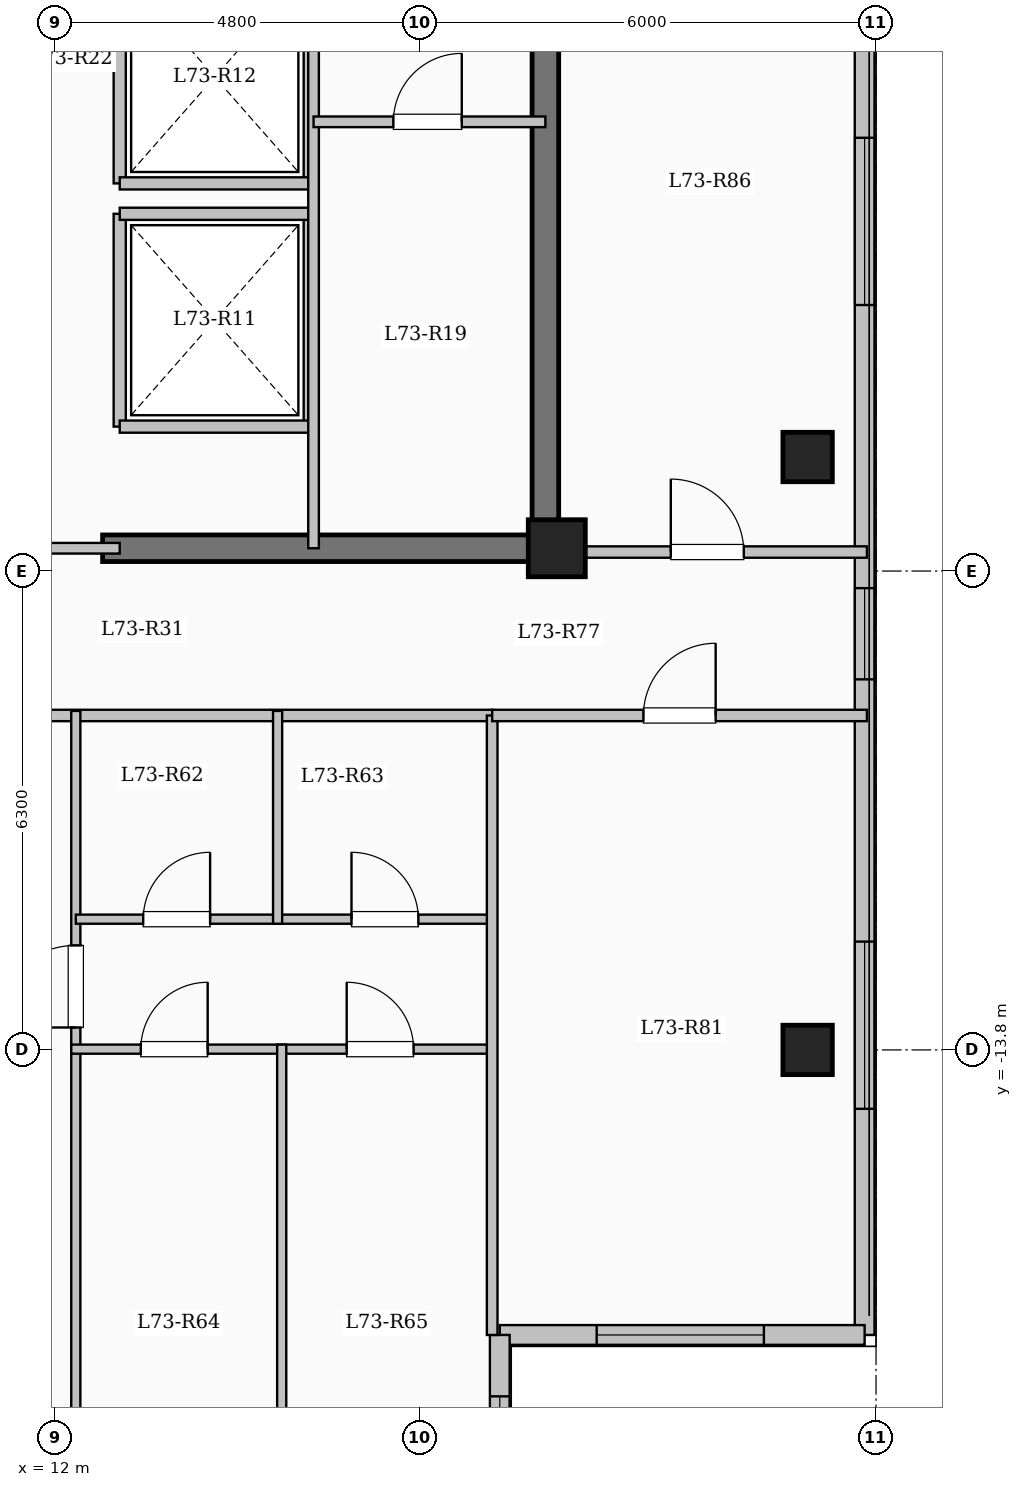
"""IFC4 building model, lengths in metres.
Left out: names, types, materials, properties, quantities, classifications, styles, units other than length and angle.
Written with IfcOpenShell. Run it as: python <this file> out.ifc"""

import sys

from ifc_helpers import new_model, si_unit, direction, frame, frame_2d, origin, origin_2d, place, context, subcontext, project, spatial, rectangle, extrude, element, fill, save


model = new_model("IFC4")
c1 = context("Model", 3, precision=1e-05, world=origin(), true_north=direction((0.0, 1.0)))
c2 = subcontext(c1, "Body", "Model", "MODEL_VIEW")
j1 = project(units=[si_unit("LENGTHUNIT", "METRE"), si_unit("PLANEANGLEUNIT", "RADIAN")], contexts=[c1])
p1 = place(None, origin())
s1 = spatial("IfcSite", under=j1, at=p1, CompositionType="ELEMENT")
p2 = place(p1, origin())
s2 = spatial("IfcBuilding", under=s1, at=p2, CompositionType="ELEMENT")
p3 = place(p2, frame((0.0, 0.0, 268.3)))
s3 = spatial("IfcBuildingStorey", under=s2, at=p3, CompositionType="ELEMENT", Elevation=268.3)
p4 = place(p3, frame((18.6, -7.2, 0.0), z_axis=(0.0, 0.0, 1.0), x_axis=(1.0, 0.0, 0.0)))
e1 = element("IfcColumn", 1, at=p4, inside=s3, PredefinedType="COLUMN", context=c2, shape_type="SweptSolid", body=[
    extrude(rectangle(XDim=0.75, YDim=0.75, at=origin_2d()), origin(), (0.0, 0.0, 1.0), 3.35),
])
for number, where, z_axis, x_axis in (
    (2, (21.9, -13.8, 0.0), (0.0, 0.0, 1.0), (1.0, 0.0, 0.0)),
    (3, (21.9, -6.0, 0.0), (0.0, 0.0, 1.0), (1.0, 0.0, 0.0)),
):
    element("IfcColumn", number, at=place(p3, frame(where, z_axis=z_axis, x_axis=x_axis)), inside=s3, PredefinedType="COLUMN", context=c2, shape_type="SweptSolid", body=[
        extrude(rectangle(XDim=0.65, YDim=0.65, at=origin_2d()), origin(), (0.0, 0.0, 1.0), 3.35),
    ])
p5 = place(p3, frame((22.65, 17.55, 0.0), z_axis=(0.0, 0.0, 1.0), x_axis=(0.0, -1.0, 0.0)))
e4 = element("IfcWall", 4, at=p5, inside=s3, PredefinedType="SOLIDWALL", context=c2, shape_type="SweptSolid", body=[
    extrude(rectangle(XDim=35.1, YDim=0.26, at=frame_2d((17.55, 0.0))), origin(), (0.0, 0.0, 1.0), 3.05),
])
p6 = place(p5, frame((1.525, 0.0, 0.9)))
e5 = element("IfcOpeningElement", 5, at=p6, cuts=e4, PredefinedType="OPENING", context=c2, shape_type="SweptSolid", body=[
    extrude(rectangle(XDim=2.0, YDim=1.7, at=frame_2d((1.0, 0.85))), frame((0.0, 0.14, 0.0), z_axis=(0.0, -1.0, 0.0), x_axis=(1.0, 0.0, 0.0)), (0.0, 0.0, 1.0), 0.28),
])
p7 = place(p5, frame((5.425, 0.0, 0.95)))
e6 = element("IfcOpeningElement", 6, at=p7, cuts=e4, PredefinedType="OPENING", context=c2, shape_type="SweptSolid", body=[
    extrude(rectangle(XDim=1.0, YDim=1.5, at=frame_2d((0.5, 0.75))), frame((0.0, 0.14, 0.0), z_axis=(0.0, -1.0, 0.0), x_axis=(1.0, 0.0, 0.0)), (0.0, 0.0, 1.0), 0.28),
])
p8 = place(p5, frame((8.675, 0.0, 0.9)))
e7 = element("IfcOpeningElement", 7, at=p8, cuts=e4, PredefinedType="OPENING", context=c2, shape_type="SweptSolid", body=[
    extrude(rectangle(XDim=2.0, YDim=1.7, at=frame_2d((1.0, 0.85))), frame((0.0, 0.14, 0.0), z_axis=(0.0, -1.0, 0.0), x_axis=(1.0, 0.0, 0.0)), (0.0, 0.0, 1.0), 0.28),
])
p9 = place(p5, frame((13.5, 0.0, 0.9)))
e8 = element("IfcOpeningElement", 8, at=p9, cuts=e4, PredefinedType="OPENING", context=c2, shape_type="SweptSolid", body=[
    extrude(rectangle(XDim=1.65, YDim=1.6, at=frame_2d((0.825, 0.8))), frame((0.0, 0.14, 0.0), z_axis=(0.0, -1.0, 0.0), x_axis=(1.0, 0.0, 0.0)), (0.0, 0.0, 1.0), 0.28),
])
p10 = place(p5, frame((19.35, 0.0, 0.9)))
e9 = element("IfcOpeningElement", 9, at=p10, cuts=e4, PredefinedType="OPENING", context=c2, shape_type="SweptSolid", body=[
    extrude(rectangle(XDim=2.2, YDim=1.75, at=frame_2d((1.1, 0.875))), frame((0.0, 0.14, 0.0), z_axis=(0.0, -1.0, 0.0), x_axis=(1.0, 0.0, 0.0)), (0.0, 0.0, 1.0), 0.28),
])
p11 = place(p5, frame((25.275, 0.0, 0.95)))
e10 = element("IfcOpeningElement", 10, at=p11, cuts=e4, PredefinedType="OPENING", context=c2, shape_type="SweptSolid", body=[
    extrude(rectangle(XDim=1.2, YDim=1.5, at=frame_2d((0.6, 0.75))), frame((0.0, 0.14, 0.0), z_axis=(0.0, -1.0, 0.0), x_axis=(1.0, 0.0, 0.0)), (0.0, 0.0, 1.0), 0.28),
])
p12 = place(p5, frame((29.925, 0.0, 0.9)))
e11 = element("IfcOpeningElement", 11, at=p12, cuts=e4, PredefinedType="OPENING", context=c2, shape_type="SweptSolid", body=[
    extrude(rectangle(XDim=2.2, YDim=1.75, at=frame_2d((1.1, 0.875))), frame((0.0, 0.14, 0.0), z_axis=(0.0, -1.0, 0.0), x_axis=(1.0, 0.0, 0.0)), (0.0, 0.0, 1.0), 0.28),
])
p13 = place(p3, frame((22.65, -17.55, 0.0), z_axis=(0.0, 0.0, 1.0), x_axis=(-1.0, 0.0, 0.0)))
e12 = element("IfcWall", 12, at=p13, inside=s3, PredefinedType="SOLIDWALL", context=c2, shape_type="SweptSolid", body=[
    extrude(rectangle(XDim=4.8, YDim=0.26, at=frame_2d((2.4, 0.0))), origin(), (0.0, 0.0, 1.0), 3.05),
])
p14 = place(p13, frame((1.325, 0.0, 0.9)))
e13 = element("IfcOpeningElement", 13, at=p14, cuts=e12, PredefinedType="OPENING", context=c2, shape_type="SweptSolid", body=[
    extrude(rectangle(XDim=2.2, YDim=1.75, at=frame_2d((1.1, 0.875))), frame((0.0, 0.14, 0.0), z_axis=(0.0, -1.0, 0.0), x_axis=(1.0, 0.0, 0.0)), (0.0, 0.0, 1.0), 0.28),
])
p15 = place(p3, frame((17.85, -17.55, 0.0), z_axis=(0.0, 0.0, 1.0), x_axis=(0.0, -1.0, 0.0)))
e14 = element("IfcWall", 14, at=p15, inside=s3, PredefinedType="SOLIDWALL", context=c2, shape_type="SweptSolid", body=[
    extrude(rectangle(XDim=3.3, YDim=0.26, at=frame_2d((1.65, 0.0))), origin(), (0.0, 0.0, 1.0), 3.05),
])
p16 = place(p15, frame((0.808, 0.0, 0.9)))
e15 = element("IfcOpeningElement", 15, at=p16, cuts=e14, PredefinedType="OPENING", context=c2, shape_type="SweptSolid", body=[
    extrude(rectangle(XDim=1.65, YDim=1.6, at=frame_2d((0.825, 0.8))), frame((0.0, 0.14, 0.0), z_axis=(0.0, -1.0, 0.0), x_axis=(1.0, 0.0, 0.0)), (0.0, 0.0, 1.0), 0.28),
])
for number, where, z_axis, x_axis in (
    (16, (12.85, -5.6, 0.0), (0.0, 0.0, 1.0), (0.0, 1.0, 0.0)),
    (17, (15.35, -5.6, 0.0), (0.0, 0.0, 1.0), (0.0, 1.0, 0.0)),
):
    element("IfcWall", number, at=place(p3, frame(where, z_axis=z_axis, x_axis=x_axis)), inside=s3, PredefinedType="SOLIDWALL", context=c2, shape_type="SweptSolid", body=[
        extrude(rectangle(XDim=2.8, YDim=0.16, at=frame_2d((1.4, 0.0))), origin(), (0.0, 0.0, 1.0), 3.05),
    ])
for number, where, z_axis, x_axis in (
    (18, (12.85, -5.6, 0.0), (0.0, 0.0, 1.0), (1.0, 0.0, 0.0)),
    (19, (12.85, -2.8, 0.0), (0.0, 0.0, 1.0), (1.0, 0.0, 0.0)),
):
    element("IfcWall", number, at=place(p3, frame(where, z_axis=z_axis, x_axis=x_axis)), inside=s3, PredefinedType="SOLIDWALL", context=c2, shape_type="SweptSolid", body=[
        extrude(rectangle(XDim=2.5, YDim=0.16, at=frame_2d((1.25, 0.0))), origin(), (0.0, 0.0, 1.0), 3.05),
    ])
for number, where, z_axis, x_axis in (
    (20, (12.85, -2.4, 0.0), (0.0, 0.0, 1.0), (0.0, 1.0, 0.0)),
    (21, (15.35, -2.4, 0.0), (0.0, 0.0, 1.0), (0.0, 1.0, 0.0)),
):
    element("IfcWall", number, at=place(p3, frame(where, z_axis=z_axis, x_axis=x_axis)), inside=s3, PredefinedType="SOLIDWALL", context=c2, shape_type="SweptSolid", body=[
        extrude(rectangle(XDim=2.8, YDim=0.16, at=frame_2d((1.4, 0.0))), origin(), (0.0, 0.0, 1.0), 3.05),
    ])
p17 = place(p3, frame((12.85, -2.4, 0.0), z_axis=(0.0, 0.0, 1.0), x_axis=(1.0, 0.0, 0.0)))
e22 = element("IfcWall", 22, at=p17, inside=s3, PredefinedType="SOLIDWALL", context=c2, shape_type="SweptSolid", body=[
    extrude(rectangle(XDim=2.5, YDim=0.16, at=frame_2d((1.25, 0.0))), origin(), (0.0, 0.0, 1.0), 3.05),
])
p18 = place(p3, frame((18.45, -7.375, 0.0), z_axis=(0.0, 0.0, 1.0), x_axis=(0.0, 1.0, 0.0)))
e23 = element("IfcWall", 23, at=p18, inside=s3, PredefinedType="SHEAR", context=c2, shape_type="SweptSolid", body=[
    extrude(rectangle(XDim=14.05, YDim=0.35, at=frame_2d((7.025, 0.0))), origin(), (0.0, 0.0, 1.0), 3.35),
])
p19 = place(p3, frame((12.625, -7.2, 0.0), z_axis=(0.0, 0.0, 1.0), x_axis=(1.0, 0.0, 0.0)))
e24 = element("IfcWall", 24, at=p19, inside=s3, PredefinedType="SHEAR", context=c2, shape_type="SweptSolid", body=[
    extrude(rectangle(XDim=6.0, YDim=0.35, at=frame_2d((3.0, 0.0))), origin(), (0.0, 0.0, 1.0), 3.35),
])
p20 = place(p3, frame((15.4, -7.2, 0.0), z_axis=(0.0, 0.0, 1.0), x_axis=(0.0, 1.0, 0.0)))
e25 = element("IfcWall", 25, at=p20, inside=s3, PredefinedType="PARTITIONING", context=c2, shape_type="SweptSolid", body=[
    extrude(rectangle(XDim=10.45, YDim=0.14, at=frame_2d((5.225, 0.0))), origin(), (0.0, 0.0, 1.0), 3.05),
])
p21 = place(p20, frame((9.25, 0.0, 0.0)))
e26 = element("IfcOpeningElement", 26, at=p21, cuts=e25, PredefinedType="OPENING", context=c2, shape_type="SweptSolid", body=[
    extrude(rectangle(XDim=0.9, YDim=2.08, at=frame_2d((0.45, 1.04))), frame((0.0, 0.08, 0.0), z_axis=(0.0, -1.0, 0.0), x_axis=(1.0, 0.0, 0.0)), (0.0, 0.0, 1.0), 0.16),
])
p22 = place(p3, frame((15.4, -1.59, 0.0), z_axis=(0.0, 0.0, 1.0), x_axis=(1.0, 0.0, 0.0)))
e27 = element("IfcWall", 27, at=p22, inside=s3, PredefinedType="PARTITIONING", context=c2, shape_type="SweptSolid", body=[
    extrude(rectangle(XDim=3.05, YDim=0.14, at=frame_2d((1.525, 0.0))), origin(), (0.0, 0.0, 1.0), 3.05),
])
p23 = place(p22, frame((1.05, 0.0, 0.0)))
e28 = element("IfcOpeningElement", 28, at=p23, cuts=e27, PredefinedType="OPENING", context=c2, shape_type="SweptSolid", body=[
    extrude(rectangle(XDim=0.9, YDim=2.08, at=frame_2d((0.45, 1.04))), frame((0.0, 0.08, 0.0), z_axis=(0.0, -1.0, 0.0), x_axis=(1.0, 0.0, 0.0)), (0.0, 0.0, 1.0), 0.16),
])
p24 = place(p3, frame((11.52, -7.2, 0.0), z_axis=(0.0, 0.0, 1.0), x_axis=(1.0, 0.0, 0.0)))
e29 = element("IfcWall", 29, at=p24, inside=s3, PredefinedType="PARTITIONING", context=c2, shape_type="SweptSolid", body=[
    extrude(rectangle(XDim=1.33, YDim=0.14, at=frame_2d((0.665, 0.0))), origin(), (0.0, 0.0, 1.0), 2.22),
])
p25 = place(p3, frame((8.55, -9.4, 0.0), z_axis=(0.0, 0.0, 1.0), x_axis=(1.0, 0.0, 0.0)))
e30 = element("IfcWall", 30, at=p25, inside=s3, PredefinedType="PARTITIONING", context=c2, shape_type="SweptSolid", body=[
    extrude(rectangle(XDim=9.2, YDim=0.15, at=frame_2d((4.6, 0.0))), origin(), (0.0, 0.0, 1.0), 3.05),
])
p26 = place(p25, frame((0.75, 0.0, 0.0)))
e31 = element("IfcOpeningElement", 31, at=p26, cuts=e30, PredefinedType="OPENING", context=c2, shape_type="SweptSolid", body=[
    extrude(rectangle(XDim=0.96, YDim=2.15, at=frame_2d((0.48, 1.075))), frame((0.0, 0.085, 0.0), z_axis=(0.0, -1.0, 0.0), x_axis=(1.0, 0.0, 0.0)), (0.0, 0.0, 1.0), 0.17),
])
p27 = place(p3, frame((12.272, -20.9, 0.0), z_axis=(0.0, 0.0, 1.0), x_axis=(0.0, 1.0, 0.0)))
e32 = element("IfcWall", 32, at=p27, inside=s3, PredefinedType="PARTITIONING", context=c2, shape_type="SweptSolid", body=[
    extrude(rectangle(XDim=11.56, YDim=0.12, at=frame_2d((5.78, 0.0))), origin(), (0.0, 0.0, 1.0), 3.05),
])
p28 = place(p27, frame((7.395, 0.0, 0.0)))
e33 = element("IfcOpeningElement", 33, at=p28, cuts=e32, PredefinedType="OPENING", context=c2, shape_type="SweptSolid", body=[
    extrude(rectangle(XDim=1.08, YDim=2.15, at=frame_2d((0.54, 1.075))), frame((0.0, 0.07, 0.0), z_axis=(0.0, -1.0, 0.0), x_axis=(1.0, 0.0, 0.0)), (0.0, 0.0, 1.0), 0.14),
])
p29 = place(p3, frame((12.272, -12.08, 0.0), z_axis=(0.0, 0.0, 1.0), x_axis=(1.0, 0.0, 0.0)))
e34 = element("IfcWall", 34, at=p29, inside=s3, PredefinedType="PARTITIONING", context=c2, shape_type="SweptSolid", body=[
    extrude(rectangle(XDim=2.655, YDim=0.12, at=frame_2d((1.328, 0.0))), origin(), (0.0, 0.0, 1.0), 2.735),
])
p30 = place(p29, frame((0.887, 0.0, 0.0)))
e35 = element("IfcOpeningElement", 35, at=p30, cuts=e34, PredefinedType="OPENING", context=c2, shape_type="SweptSolid", body=[
    extrude(rectangle(XDim=0.88, YDim=2.1, at=frame_2d((0.44, 1.05))), frame((0.0, 0.07, 0.0), z_axis=(0.0, -1.0, 0.0), x_axis=(1.0, 0.0, 0.0)), (0.0, 0.0, 1.0), 0.14),
])
p31 = place(p3, frame((14.927, -12.08, 0.0), z_axis=(0.0, 0.0, 1.0), x_axis=(1.0, 0.0, 0.0)))
e36 = element("IfcWall", 36, at=p31, inside=s3, PredefinedType="PARTITIONING", context=c2, shape_type="SweptSolid", body=[
    extrude(rectangle(XDim=2.823, YDim=0.12, at=frame_2d((1.412, 0.0))), origin(), (0.0, 0.0, 1.0), 3.05),
])
p32 = place(p31, frame((0.972, 0.0, 0.0)))
e37 = element("IfcOpeningElement", 37, at=p32, cuts=e36, PredefinedType="OPENING", context=c2, shape_type="SweptSolid", body=[
    extrude(rectangle(XDim=0.88, YDim=2.1, at=frame_2d((0.44, 1.05))), frame((0.0, 0.07, 0.0), z_axis=(0.0, -1.0, 0.0), x_axis=(1.0, 0.0, 0.0)), (0.0, 0.0, 1.0), 0.14),
])
p33 = place(p3, frame((12.212, -13.79, 0.0), z_axis=(0.0, 0.0, 1.0), x_axis=(1.0, 0.0, 0.0)))
e38 = element("IfcWall", 38, at=p33, inside=s3, PredefinedType="PARTITIONING", context=c2, shape_type="SweptSolid", body=[
    extrude(rectangle(XDim=5.598, YDim=0.12, at=frame_2d((2.799, 0.0))), origin(), (0.0, 0.0, 1.0), 2.735),
])
p34 = place(p33, frame((0.915, 0.0, 0.0)))
e39 = element("IfcOpeningElement", 39, at=p34, cuts=e38, PredefinedType="OPENING", context=c2, shape_type="SweptSolid", body=[
    extrude(rectangle(XDim=0.88, YDim=2.1, at=frame_2d((0.44, 1.05))), frame((0.0, 0.07, 0.0), z_axis=(0.0, -1.0, 0.0), x_axis=(1.0, 0.0, 0.0)), (0.0, 0.0, 1.0), 0.14),
])
p35 = place(p33, frame((3.624, 0.0, 0.0)))
e40 = element("IfcOpeningElement", 40, at=p35, cuts=e38, PredefinedType="OPENING", context=c2, shape_type="SweptSolid", body=[
    extrude(rectangle(XDim=0.88, YDim=2.1, at=frame_2d((0.44, 1.05))), frame((0.0, 0.07, 0.0), z_axis=(0.0, -1.0, 0.0), x_axis=(1.0, 0.0, 0.0)), (0.0, 0.0, 1.0), 0.14),
])
p36 = place(p3, frame((14.927, -12.14, 0.0), z_axis=(0.0, 0.0, 1.0), x_axis=(0.0, 1.0, 0.0)))
e41 = element("IfcWall", 41, at=p36, inside=s3, PredefinedType="PARTITIONING", context=c2, shape_type="SweptSolid", body=[
    extrude(rectangle(XDim=2.8, YDim=0.12, at=frame_2d((1.4, 0.0))), origin(), (0.0, 0.0, 1.0), 2.635),
])
p37 = place(p3, frame((14.981, -20.9, 0.0), z_axis=(0.0, 0.0, 1.0), x_axis=(0.0, 1.0, 0.0)))
e42 = element("IfcWall", 42, at=p37, inside=s3, PredefinedType="PARTITIONING", context=c2, shape_type="SweptSolid", body=[
    extrude(rectangle(XDim=7.17, YDim=0.12, at=frame_2d((3.585, 0.0))), origin(), (0.0, 0.0, 1.0), 2.635),
])
p38 = place(p3, frame((18.45, -7.25, 0.0), z_axis=(0.0, 0.0, 1.0), x_axis=(1.0, 0.0, 0.0)))
e43 = element("IfcWall", 43, at=p38, inside=s3, PredefinedType="PARTITIONING", context=c2, shape_type="SweptSolid", body=[
    extrude(rectangle(XDim=4.23, YDim=0.15, at=frame_2d((2.115, 0.0))), origin(), (0.0, 0.0, 1.0), 3.05),
])
p39 = place(p38, frame((1.65, 0.0, 0.0)))
e44 = element("IfcOpeningElement", 44, at=p39, cuts=e43, PredefinedType="OPENING", context=c2, shape_type="SweptSolid", body=[
    extrude(rectangle(XDim=0.96, YDim=2.15, at=frame_2d((0.48, 1.075))), frame((0.0, 0.085, 0.0), z_axis=(0.0, -1.0, 0.0), x_axis=(1.0, 0.0, 0.0)), (0.0, 0.0, 1.0), 0.17),
])
p40 = place(p3, frame((17.75, -17.55, 0.0), z_axis=(0.0, 0.0, 1.0), x_axis=(0.0, 1.0, 0.0)))
e45 = element("IfcWall", 45, at=p40, inside=s3, PredefinedType="PARTITIONING", context=c2, shape_type="SweptSolid", body=[
    extrude(rectangle(XDim=8.15, YDim=0.14, at=frame_2d((4.075, 0.0))), origin(), (0.0, 0.0, 1.0), 3.05),
])
p41 = place(p3, frame((17.75, -9.4, 0.0), z_axis=(0.0, 0.0, 1.0), x_axis=(1.0, 0.0, 0.0)))
e46 = element("IfcWall", 46, at=p41, inside=s3, PredefinedType="PARTITIONING", context=c2, shape_type="SweptSolid", body=[
    extrude(rectangle(XDim=4.93, YDim=0.15, at=frame_2d((2.465, 0.0))), origin(), (0.0, 0.0, 1.0), 3.05),
])
p42 = place(p41, frame((1.99, 0.0, 0.0)))
e47 = element("IfcOpeningElement", 47, at=p42, cuts=e46, PredefinedType="OPENING", context=c2, shape_type="SweptSolid", body=[
    extrude(rectangle(XDim=0.95, YDim=2.15, at=frame_2d((0.475, 1.075))), frame((0.0, 0.085, 0.0), z_axis=(0.0, -1.0, 0.0), x_axis=(1.0, 0.0, 0.0)), (0.0, 0.0, 1.0), 0.17),
])
p43 = place(p10, origin())
e48 = element("IfcWindow", 48, at=p43, inside=s3, PartitioningType="SINGLE_PANEL", PredefinedType="WINDOW", context=c2, shape_type="SweptSolid", body=[
    extrude(rectangle(XDim=2.2, YDim=1.75, at=frame_2d((1.1, 0.875))), frame((0.0, 0.03, 0.0), z_axis=(0.0, -1.0, 0.0), x_axis=(1.0, 0.0, 0.0)), (0.0, 0.0, 1.0), 0.06),
])
fill(e9, e48)
p44 = place(p11, origin())
e49 = element("IfcWindow", 49, at=p44, inside=s3, PartitioningType="SINGLE_PANEL", PredefinedType="WINDOW", context=c2, shape_type="SweptSolid", body=[
    extrude(rectangle(XDim=1.2, YDim=1.5, at=frame_2d((0.6, 0.75))), frame((0.0, 0.03, 0.0), z_axis=(0.0, -1.0, 0.0), x_axis=(1.0, 0.0, 0.0)), (0.0, 0.0, 1.0), 0.06),
])
fill(e10, e49)
p45 = place(p12, origin())
e50 = element("IfcWindow", 50, at=p45, inside=s3, PartitioningType="SINGLE_PANEL", PredefinedType="WINDOW", context=c2, shape_type="SweptSolid", body=[
    extrude(rectangle(XDim=2.2, YDim=1.75, at=frame_2d((1.1, 0.875))), frame((0.0, 0.03, 0.0), z_axis=(0.0, -1.0, 0.0), x_axis=(1.0, 0.0, 0.0)), (0.0, 0.0, 1.0), 0.06),
])
fill(e11, e50)
p46 = place(p14, origin())
e51 = element("IfcWindow", 51, at=p46, inside=s3, PartitioningType="SINGLE_PANEL", PredefinedType="WINDOW", context=c2, shape_type="SweptSolid", body=[
    extrude(rectangle(XDim=2.2, YDim=1.75, at=frame_2d((1.1, 0.875))), frame((0.0, 0.03, 0.0), z_axis=(0.0, -1.0, 0.0), x_axis=(1.0, 0.0, 0.0)), (0.0, 0.0, 1.0), 0.06),
])
fill(e13, e51)
p47 = place(p16, origin())
e52 = element("IfcWindow", 52, at=p47, inside=s3, PartitioningType="SINGLE_PANEL", PredefinedType="WINDOW", context=c2, shape_type="SweptSolid", body=[
    extrude(rectangle(XDim=1.65, YDim=1.6, at=frame_2d((0.825, 0.8))), frame((0.0, 0.03, 0.0), z_axis=(0.0, -1.0, 0.0), x_axis=(1.0, 0.0, 0.0)), (0.0, 0.0, 1.0), 0.06),
])
fill(e15, e52)
p48 = place(p23, origin())
e53 = element("IfcDoor", 53, at=p48, inside=s3, OperationType="SINGLE_SWING_RIGHT", PredefinedType="DOOR", context=c2, shape_type="SweptSolid", body=[
    extrude(rectangle(XDim=0.9, YDim=2.08, at=frame_2d((0.45, 1.04))), frame((0.0, 0.025, 0.0), z_axis=(0.0, -1.0, 0.0), x_axis=(1.0, 0.0, 0.0)), (0.0, 0.0, 1.0), 0.05),
])
fill(e28, e53)
p49 = place(p28, origin())
e54 = element("IfcDoor", 54, at=p49, inside=s3, OperationType="SINGLE_SWING_LEFT", PredefinedType="DOOR", context=c2, shape_type="SweptSolid", body=[
    extrude(rectangle(XDim=1.08, YDim=2.15, at=frame_2d((0.54, 1.075))), frame((0.0, 0.025, 0.0), z_axis=(0.0, -1.0, 0.0), x_axis=(1.0, 0.0, 0.0)), (0.0, 0.0, 1.0), 0.05),
])
fill(e33, e54)
p50 = place(p30, origin())
e55 = element("IfcDoor", 55, at=p50, inside=s3, OperationType="SINGLE_SWING_RIGHT", PredefinedType="DOOR", context=c2, shape_type="SweptSolid", body=[
    extrude(rectangle(XDim=0.88, YDim=2.1, at=frame_2d((0.44, 1.05))), frame((0.0, 0.025, 0.0), z_axis=(0.0, -1.0, 0.0), x_axis=(1.0, 0.0, 0.0)), (0.0, 0.0, 1.0), 0.05),
])
fill(e35, e55)
p51 = place(p32, origin())
e56 = element("IfcDoor", 56, at=p51, inside=s3, OperationType="SINGLE_SWING_LEFT", PredefinedType="DOOR", context=c2, shape_type="SweptSolid", body=[
    extrude(rectangle(XDim=0.88, YDim=2.1, at=frame_2d((0.44, 1.05))), frame((0.0, 0.025, 0.0), z_axis=(0.0, -1.0, 0.0), x_axis=(1.0, 0.0, 0.0)), (0.0, 0.0, 1.0), 0.05),
])
fill(e37, e56)
p52 = place(p34, origin())
e57 = element("IfcDoor", 57, at=p52, inside=s3, OperationType="SINGLE_SWING_RIGHT", PredefinedType="DOOR", context=c2, shape_type="SweptSolid", body=[
    extrude(rectangle(XDim=0.88, YDim=2.1, at=frame_2d((0.44, 1.05))), frame((0.0, 0.025, 0.0), z_axis=(0.0, -1.0, 0.0), x_axis=(1.0, 0.0, 0.0)), (0.0, 0.0, 1.0), 0.05),
])
fill(e39, e57)
p53 = place(p35, origin())
e58 = element("IfcDoor", 58, at=p53, inside=s3, OperationType="SINGLE_SWING_LEFT", PredefinedType="DOOR", context=c2, shape_type="SweptSolid", body=[
    extrude(rectangle(XDim=0.88, YDim=2.1, at=frame_2d((0.44, 1.05))), frame((0.0, 0.025, 0.0), z_axis=(0.0, -1.0, 0.0), x_axis=(1.0, 0.0, 0.0)), (0.0, 0.0, 1.0), 0.05),
])
fill(e40, e58)
p54 = place(p42, origin())
e59 = element("IfcDoor", 59, at=p54, inside=s3, OperationType="SINGLE_SWING_RIGHT", PredefinedType="DOOR", context=c2, shape_type="SweptSolid", body=[
    extrude(rectangle(XDim=0.95, YDim=2.15, at=frame_2d((0.475, 1.075))), frame((0.0, 0.025, 0.0), z_axis=(0.0, -1.0, 0.0), x_axis=(1.0, 0.0, 0.0)), (0.0, 0.0, 1.0), 0.05),
])
fill(e47, e59)
p55 = place(p39, origin())
e60 = element("IfcDoor", 60, at=p55, inside=s3, OperationType="SINGLE_SWING_LEFT", PredefinedType="DOOR", context=c2, shape_type="SweptSolid", body=[
    extrude(rectangle(XDim=0.96, YDim=2.15, at=frame_2d((0.48, 1.075))), frame((0.0, 0.025, 0.0), z_axis=(0.0, -1.0, 0.0), x_axis=(1.0, 0.0, 0.0)), (0.0, 0.0, 1.0), 0.05),
])
fill(e44, e60)
save(model, sys.argv[1])
